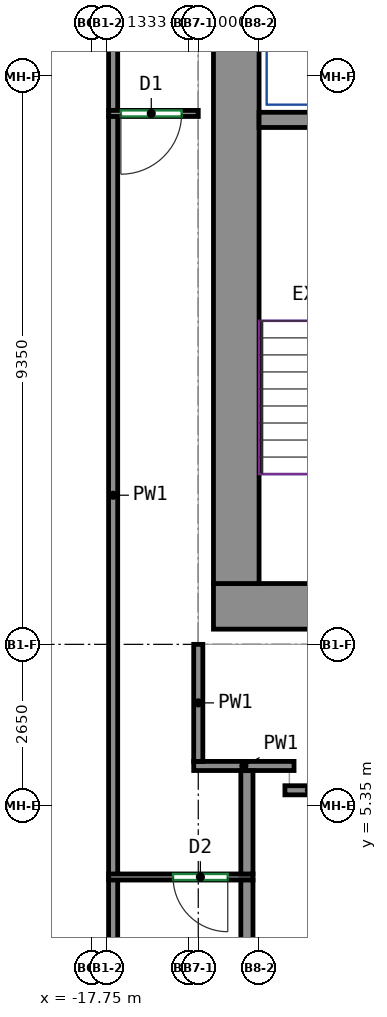
"""IFC4 building model, lengths in metres.
Left out: names, types, materials, properties, quantities, classifications, styles, units other than length and angle.
Written with IfcOpenShell. Run it as: python <this file> out.ifc"""

import sys

from ifc_helpers import new_model, si_unit, direction, frame, frame_2d, origin, place, context, subcontext, project, spatial, rectangle, extrude, source, transform, mapped, element, fill, save


model = new_model("IFC4")
c1 = context("Model", 3, precision=1e-05, world=origin(), true_north=direction((0.0, 1.0)))
c2 = subcontext(c1, "Body", "Model", "MODEL_VIEW")
j1 = project(units=[si_unit("LENGTHUNIT", "METRE"), si_unit("PLANEANGLEUNIT", "RADIAN")], contexts=[c1])
p1 = place(None, origin())
s1 = spatial("IfcSite", under=j1, at=p1, CompositionType="ELEMENT")
p2 = place(p1, origin())
s2 = spatial("IfcBuilding", under=s1, at=p2, CompositionType="ELEMENT")
p3 = place(p2, frame((0.0, 0.0, 256.0)))
s3 = spatial("IfcBuildingStorey", under=s2, at=p3, CompositionType="ELEMENT", Elevation=256.0)
m1 = source(origin(), c2, "Body", "SweptSolid", [
    extrude(rectangle(XDim=5.38, YDim=0.75, at=frame_2d((2.69, 0.0))), origin(), (0.0, 0.0, 1.0), 3.12),
])
p4 = place(p3, frame((-15.75, 8.625, 0.0), z_axis=(0.0, 0.0, 1.0), x_axis=(1.0, 0.0, 0.0)))
e1 = element("IfcWall", 1, at=p4, inside=s3, PredefinedType="SHEAR", context=c2, shape_type="MappedRepresentation", body=[
    mapped(m1, transform((0.0, 0.0, 0.0))),
])
p5 = place(p4, frame((2.0, 0.0, 0.0)))
e2 = element("IfcOpeningElement", 2, at=p5, cuts=e1, PredefinedType="OPENING", context=c2, shape_type="SweptSolid", body=[
    extrude(rectangle(XDim=1.2, YDim=2.1, at=frame_2d((0.6, 1.05))), frame((0.0, 0.385, 0.0), z_axis=(0.0, -1.0, 0.0), x_axis=(1.0, 0.0, 0.0)), (0.0, 0.0, 1.0), 0.77),
])
m2 = source(origin(), c2, "Body", "SweptSolid", [
    extrude(rectangle(XDim=12.0, YDim=0.75, at=frame_2d((6.0, 0.0))), origin(), (0.0, 0.0, 1.0), 3.12),
])
p6 = place(p3, frame((-15.375, 9.0, 0.0), z_axis=(0.0, 0.0, 1.0), x_axis=(0.0, 1.0, 0.0)))
e3 = element("IfcWall", 3, at=p6, inside=s3, PredefinedType="SHEAR", context=c2, shape_type="MappedRepresentation", body=[
    mapped(m2, transform((0.0, 0.0, 0.0))),
])
m3 = source(origin(), c2, "Body", "SweptSolid", [
    extrude(rectangle(XDim=3.7, YDim=0.25, at=frame_2d((1.85, 0.0))), origin(), (0.0, 0.0, 1.0), 3.12),
])
p7 = place(p3, frame((-15.0, 16.625, 0.0), z_axis=(0.0, 0.0, 1.0), x_axis=(1.0, 0.0, 0.0)))
e4 = element("IfcWall", 4, at=p7, inside=s3, PredefinedType="SHEAR", context=c2, shape_type="MappedRepresentation", body=[
    mapped(m3, transform((0.0, 0.0, 0.0))),
])
p8 = place(p3, frame((-17.4, -1.791, 0.0), z_axis=(0.0, 0.0, 1.0), x_axis=(0.0, 1.0, 0.0)))
e5 = element("IfcWall", 5, at=p8, inside=s3, PredefinedType="PARTITIONING", context=c2, shape_type="SweptSolid", body=[
    extrude(rectangle(XDim=5.925, YDim=0.15, at=frame_2d((2.962, 0.0))), origin(), (0.0, 0.0, 1.0), 3.12),
])
p9 = place(p3, frame((-17.4, 4.214, 0.0), z_axis=(0.0, 0.0, 1.0), x_axis=(0.0, 1.0, 0.0)))
e6 = element("IfcWall", 6, at=p9, inside=s3, PredefinedType="PARTITIONING", context=c2, shape_type="SweptSolid", body=[
    extrude(rectangle(XDim=12.477, YDim=0.15, at=frame_2d((6.238, 0.0))), origin(), (0.0, 0.0, 1.0), 3.12),
])
p10 = place(p3, frame((-16.075, 6.0, 0.0), z_axis=(0.0, 0.0, 1.0), x_axis=(1.0, 0.0, 0.0)))
e7 = element("IfcWall", 7, at=p10, inside=s3, PredefinedType="PARTITIONING", context=c2, shape_type="SweptSolid", body=[
    extrude(rectangle(XDim=1.65, YDim=0.15, at=frame_2d((0.825, 0.0))), origin(), (0.0, 0.0, 1.0), 3.12),
])
p11 = place(p3, frame((-16.0, 6.075, 0.0), z_axis=(0.0, 0.0, 1.0), x_axis=(0.0, 1.0, 0.0)))
e8 = element("IfcWall", 8, at=p11, inside=s3, PredefinedType="PARTITIONING", context=c2, shape_type="SweptSolid", body=[
    extrude(rectangle(XDim=1.925, YDim=0.15, at=frame_2d((0.962, 0.0))), origin(), (0.0, 0.0, 1.0), 3.12),
])
p12 = place(p3, frame((-17.4, 16.771, 0.0), z_axis=(0.0, 0.0, 1.0), x_axis=(0.0, 1.0, 0.0)))
e9 = element("IfcWall", 9, at=p12, inside=s3, PredefinedType="PARTITIONING", context=c2, shape_type="SweptSolid", body=[
    extrude(rectangle(XDim=4.254, YDim=0.15, at=frame_2d((2.127, 0.0))), origin(), (0.0, 0.0, 1.0), 3.12),
])
p13 = place(p3, frame((-14.575, 5.6, 0.0), z_axis=(0.0, 0.0, 1.0), x_axis=(1.0, 0.0, 0.0)))
e10 = element("IfcWall", 10, at=p13, inside=s3, PredefinedType="PARTITIONING", context=c2, shape_type="SweptSolid", body=[
    extrude(rectangle(XDim=0.807, YDim=0.15, at=frame_2d((0.403, 0.0))), origin(), (0.0, 0.0, 1.0), 3.12),
])
p14 = place(p3, frame((-15.1, 4.174, 0.0), z_axis=(0.0, 0.0, 1.0), x_axis=(-1.0, 0.0, 0.0)))
e11 = element("IfcWall", 11, at=p14, inside=s3, PredefinedType="PARTITIONING", context=c2, shape_type="SweptSolid", body=[
    extrude(rectangle(XDim=2.373, YDim=0.1, at=frame_2d((1.187, 0.0))), origin(), (0.0, 0.0, 1.0), 3.12),
])
p15 = place(p14, frame((0.415, 0.0, 0.0)))
e12 = element("IfcOpeningElement", 12, at=p15, cuts=e11, PredefinedType="OPENING", context=c2, shape_type="SweptSolid", body=[
    extrude(rectangle(XDim=0.9, YDim=2.1, at=frame_2d((0.45, 1.05))), frame((0.0, 0.06, 0.0), z_axis=(0.0, -1.0, 0.0), x_axis=(1.0, 0.0, 0.0)), (0.0, 0.0, 1.0), 0.12),
])
p16 = place(p3, frame((-15.2, -1.781, 0.0), z_axis=(0.0, 0.0, 1.0), x_axis=(0.0, 1.0, 0.0)))
e13 = element("IfcWall", 13, at=p16, inside=s3, PredefinedType="PARTITIONING", context=c2, shape_type="SweptSolid", body=[
    extrude(rectangle(XDim=5.905, YDim=0.2, at=frame_2d((2.953, 0.0))), origin(), (0.0, 0.0, 1.0), 3.12),
])
p17 = place(p3, frame((-16.0, 16.731, 0.0), z_axis=(0.0, 0.0, 1.0), x_axis=(-1.0, 0.0, 0.0)))
e14 = element("IfcWall", 14, at=p17, inside=s3, PredefinedType="PARTITIONING", context=c2, shape_type="SweptSolid", body=[
    extrude(rectangle(XDim=1.473, YDim=0.1, at=frame_2d((0.736, 0.0))), origin(), (0.0, 0.0, 1.0), 3.12),
])
p18 = place(p17, frame((0.273, 0.0, 0.0)))
e15 = element("IfcOpeningElement", 15, at=p18, cuts=e14, PredefinedType="OPENING", context=c2, shape_type="SweptSolid", body=[
    extrude(rectangle(XDim=1.0, YDim=2.1, at=frame_2d((0.5, 1.05))), frame((0.0, 0.06, 0.0), z_axis=(0.0, -1.0, 0.0), x_axis=(1.0, 0.0, 0.0)), (0.0, 0.0, 1.0), 0.12),
])
p19 = place(p3, frame((-15.2, 4.224, 0.0), z_axis=(0.0, 0.0, 1.0), x_axis=(0.0, 1.0, 0.0)))
e16 = element("IfcWall", 16, at=p19, inside=s3, PredefinedType="PARTITIONING", context=c2, shape_type="SweptSolid", body=[
    extrude(rectangle(XDim=1.699, YDim=0.2, at=frame_2d((0.85, 0.0))), origin(), (0.0, 0.0, 1.0), 3.12),
])
p20 = place(p15, origin())
e17 = element("IfcDoor", 17, at=p20, inside=s3, OperationType="SINGLE_SWING_LEFT", PredefinedType="DOOR", context=c2, shape_type="SweptSolid", body=[
    extrude(rectangle(XDim=0.9, YDim=2.1, at=frame_2d((0.45, 1.05))), frame((0.0, 0.025, 0.0), z_axis=(0.0, -1.0, 0.0), x_axis=(1.0, 0.0, 0.0)), (0.0, 0.0, 1.0), 0.05),
])
fill(e12, e17)
p21 = place(p18, origin())
e18 = element("IfcDoor", 18, at=p21, inside=s3, OperationType="SINGLE_SWING_RIGHT", PredefinedType="DOOR", context=c2, shape_type="SweptSolid", body=[
    extrude(rectangle(XDim=1.0, YDim=2.1, at=frame_2d((0.5, 1.05))), frame((0.0, 0.025, 0.0), z_axis=(0.0, -1.0, 0.0), x_axis=(1.0, 0.0, 0.0)), (0.0, 0.0, 1.0), 0.05),
])
fill(e15, e18)
save(model, sys.argv[1])
